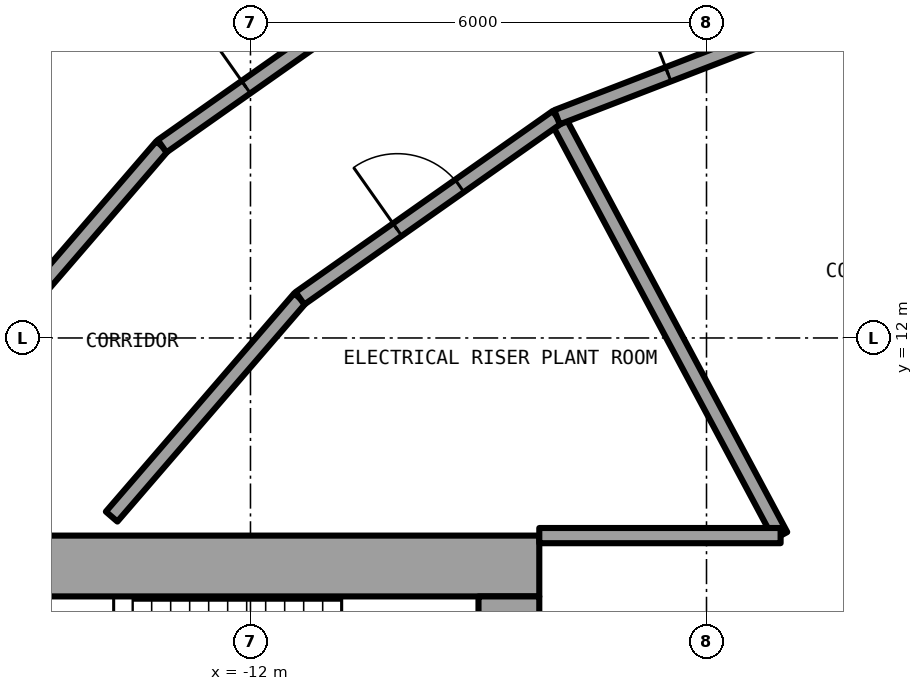
"""IFC4 building model, lengths in metres.
Left out: names, types, materials, properties, quantities, classifications, styles, units other than length and angle.
Written with IfcOpenShell. Run it as: python <this file> out.ifc"""

import sys

from ifc_helpers import new_model, si_unit, direction, frame, frame_2d, origin, place, context, subcontext, project, spatial, rectangle, extrude, element, fill, save


model = new_model("IFC4")
c1 = context("Model", 3, precision=1e-05, world=origin(), true_north=direction((0.0, 1.0)))
c2 = subcontext(c1, "Body", "Model", "MODEL_VIEW")
j1 = project(units=[si_unit("LENGTHUNIT", "METRE"), si_unit("PLANEANGLEUNIT", "RADIAN")], contexts=[c1])
p1 = place(None, origin())
s1 = spatial("IfcSite", under=j1, at=p1, CompositionType="ELEMENT")
p2 = place(p1, origin())
s2 = spatial("IfcBuilding", under=s1, at=p2, CompositionType="ELEMENT")
p3 = place(p2, frame((0.0, 0.0, 18.3)))
s3 = spatial("IfcBuildingStorey", under=s2, at=p3, CompositionType="ELEMENT", Elevation=18.3)
p4 = place(p3, frame((-8.2, 9.0, 0.0), z_axis=(0.0, 0.0, 1.0), x_axis=(-1.0, 0.0, 0.0)))
e1 = element("IfcWall", 1, at=p4, inside=s3, PredefinedType="SHEAR", context=c2, shape_type="SweptSolid", body=[
    extrude(rectangle(XDim=14.2, YDim=0.8, at=frame_2d((7.1, 0.0))), origin(), (0.0, 0.0, 1.0), 4.5),
])
p5 = place(p4, frame((11.675, 0.0, 0.0)))
e2 = element("IfcOpeningElement", 2, at=p5, cuts=e1, PredefinedType="OPENING", context=c2, shape_type="SweptSolid", body=[
    extrude(rectangle(XDim=1.2, YDim=2.3, at=frame_2d((0.6, 1.15))), frame((0.0, 0.41, 0.0), z_axis=(0.0, -1.0, 0.0), x_axis=(1.0, 0.0, 0.0)), (0.0, 0.0, 1.0), 0.82),
])
p6 = place(p3, frame((-8.6, 8.6, 0.0), z_axis=(0.0, 0.0, 1.0), x_axis=(0.0, -1.0, 0.0)))
e3 = element("IfcWall", 3, at=p6, inside=s3, PredefinedType="SHEAR", context=c2, shape_type="SweptSolid", body=[
    extrude(rectangle(XDim=17.2, YDim=0.8, at=frame_2d((8.6, 0.0))), origin(), (0.0, 0.0, 1.0), 4.5),
])
p7 = place(p6, frame((7.4, 0.0, 0.1)))
e4 = element("IfcOpeningElement", 4, at=p7, cuts=e3, PredefinedType="OPENING", context=c2, shape_type="SweptSolid", body=[
    extrude(rectangle(XDim=2.4, YDim=2.2, at=frame_2d((1.2, 1.1))), frame((0.0, 0.41, 0.0), z_axis=(0.0, -1.0, 0.0), x_axis=(1.0, 0.0, 0.0)), (0.0, 0.0, 1.0), 0.82),
])
p8 = place(p3, frame((-7.969, 14.903, 0.0), z_axis=(0.0, 0.0, 1.0), x_axis=(0.471532005808, -0.881848948232, 0.0)))
e5 = element("IfcWall", 5, at=p8, inside=s3, PredefinedType="PARTITIONING", context=c2, shape_type="SweptSolid", body=[
    extrude(rectangle(XDim=6.242, YDim=0.2, at=frame_2d((3.121, 0.0))), origin(), (0.0, 0.0, 1.0), 4.15),
])
p9 = place(p3, frame((-8.2, 9.4, 0.0), z_axis=(0.0, 0.0, 1.0), x_axis=(1.0, 0.0, 0.0)))
e6 = element("IfcWall", 6, at=p9, inside=s3, PredefinedType="PARTITIONING", context=c2, shape_type="SweptSolid", body=[
    extrude(rectangle(XDim=3.175, YDim=0.2, at=frame_2d((1.587, 0.0))), origin(), (0.0, 0.0, 1.0), 4.15),
])
p10 = place(p3, frame((-13.827, 9.65, 0.0), z_axis=(0.0, 0.0, 1.0), x_axis=(0.653220956969, 0.757167340406, 0.0)))
e7 = element("IfcWall", 7, at=p10, inside=s3, PredefinedType="PARTITIONING", context=c2, shape_type="SweptSolid", body=[
    extrude(rectangle(XDim=3.793, YDim=0.2, at=frame_2d((1.896, 0.0))), origin(), (0.0, 0.0, 1.0), 4.15),
])
p11 = place(p3, frame((-11.349, 12.522, 0.0), z_axis=(0.0, 0.0, 1.0), x_axis=(0.817567680547, 0.575832517079, 0.0)))
e8 = element("IfcWall", 8, at=p11, inside=s3, PredefinedType="PARTITIONING", context=c2, shape_type="SweptSolid", body=[
    extrude(rectangle(XDim=4.137, YDim=0.2, at=frame_2d((2.068, 0.0))), origin(), (0.0, 0.0, 1.0), 4.15),
])
p12 = place(p11, frame((1.568, 0.0, 0.0)))
e9 = element("IfcOpeningElement", 9, at=p12, cuts=e8, PredefinedType="OPENING", context=c2, shape_type="SweptSolid", body=[
    extrude(rectangle(XDim=1.0, YDim=2.3, at=frame_2d((0.5, 1.15))), frame((0.0, 0.11, 0.0), z_axis=(0.0, -1.0, 0.0), x_axis=(1.0, 0.0, 0.0)), (0.0, 0.0, 1.0), 0.22),
])
p13 = place(p3, frame((-7.967, 14.904, 0.0), z_axis=(0.0, 0.0, 1.0), x_axis=(0.932943640288, 0.360022449363, 0.0)))
e10 = element("IfcWall", 10, at=p13, inside=s3, PredefinedType="PARTITIONING", context=c2, shape_type="SweptSolid", body=[
    extrude(rectangle(XDim=4.139, YDim=0.2, at=frame_2d((2.069, 0.0))), origin(), (0.0, 0.0, 1.0), 4.15),
])
p14 = place(p13, frame((1.569, 0.0, 0.0)))
e11 = element("IfcOpeningElement", 11, at=p14, cuts=e10, PredefinedType="OPENING", context=c2, shape_type="SweptSolid", body=[
    extrude(rectangle(XDim=1.0, YDim=2.3, at=frame_2d((0.5, 1.15))), frame((0.0, 0.11, 0.0), z_axis=(0.0, -1.0, 0.0), x_axis=(1.0, 0.0, 0.0)), (0.0, 0.0, 1.0), 0.22),
])
p15 = place(p3, frame((-15.935, 11.309, 0.0), z_axis=(0.0, 0.0, 1.0), x_axis=(0.653128497371, 0.757247097005, 0.0)))
e12 = element("IfcWall", 12, at=p15, inside=s3, PredefinedType="PARTITIONING", context=c2, shape_type="SweptSolid", body=[
    extrude(rectangle(XDim=4.244, YDim=0.2, at=frame_2d((2.122, 0.0))), origin(), (0.0, 0.0, 1.0), 3.73),
])
p16 = place(p3, frame((-13.163, 14.523, 0.0), z_axis=(0.0, 0.0, 1.0), x_axis=(0.817595540973, 0.575792958781, 0.0)))
e13 = element("IfcWall", 13, at=p16, inside=s3, PredefinedType="PARTITIONING", context=c2, shape_type="SweptSolid", body=[
    extrude(rectangle(XDim=2.725, YDim=0.2, at=frame_2d((1.363, 0.0))), origin(), (0.0, 0.0, 1.0), 3.73),
])
p17 = place(p16, frame((1.35, 0.0, 0.0)))
e14 = element("IfcOpeningElement", 14, at=p17, cuts=e13, PredefinedType="OPENING", context=c2, shape_type="SweptSolid", body=[
    extrude(rectangle(XDim=1.0, YDim=2.3, at=frame_2d((0.5, 1.15))), frame((0.0, 0.11, 0.0), z_axis=(0.0, -1.0, 0.0), x_axis=(1.0, 0.0, 0.0)), (0.0, 0.0, 1.0), 0.22),
])
p18 = place(p17, origin())
e15 = element("IfcDoor", 15, at=p18, inside=s3, OperationType="SINGLE_SWING_RIGHT", PredefinedType="DOOR", context=c2, shape_type="SweptSolid", body=[
    extrude(rectangle(XDim=1.0, YDim=2.3, at=frame_2d((0.5, 1.15))), frame((0.0, 0.025, 0.0), z_axis=(0.0, -1.0, 0.0), x_axis=(1.0, 0.0, 0.0)), (0.0, 0.0, 1.0), 0.05),
])
fill(e14, e15)
p19 = place(p14, origin())
e16 = element("IfcDoor", 16, at=p19, inside=s3, OperationType="SINGLE_SWING_RIGHT", PredefinedType="DOOR", context=c2, shape_type="SweptSolid", body=[
    extrude(rectangle(XDim=1.0, YDim=2.3, at=frame_2d((0.5, 1.15))), frame((0.0, 0.025, 0.0), z_axis=(0.0, -1.0, 0.0), x_axis=(1.0, 0.0, 0.0)), (0.0, 0.0, 1.0), 0.05),
])
fill(e11, e16)
p20 = place(p12, origin())
e17 = element("IfcDoor", 17, at=p20, inside=s3, OperationType="SINGLE_SWING_RIGHT", PredefinedType="DOOR", context=c2, shape_type="SweptSolid", body=[
    extrude(rectangle(XDim=1.0, YDim=2.3, at=frame_2d((0.5, 1.15))), frame((0.0, 0.025, 0.0), z_axis=(0.0, -1.0, 0.0), x_axis=(1.0, 0.0, 0.0)), (0.0, 0.0, 1.0), 0.05),
])
fill(e9, e17)
save(model, sys.argv[1])
